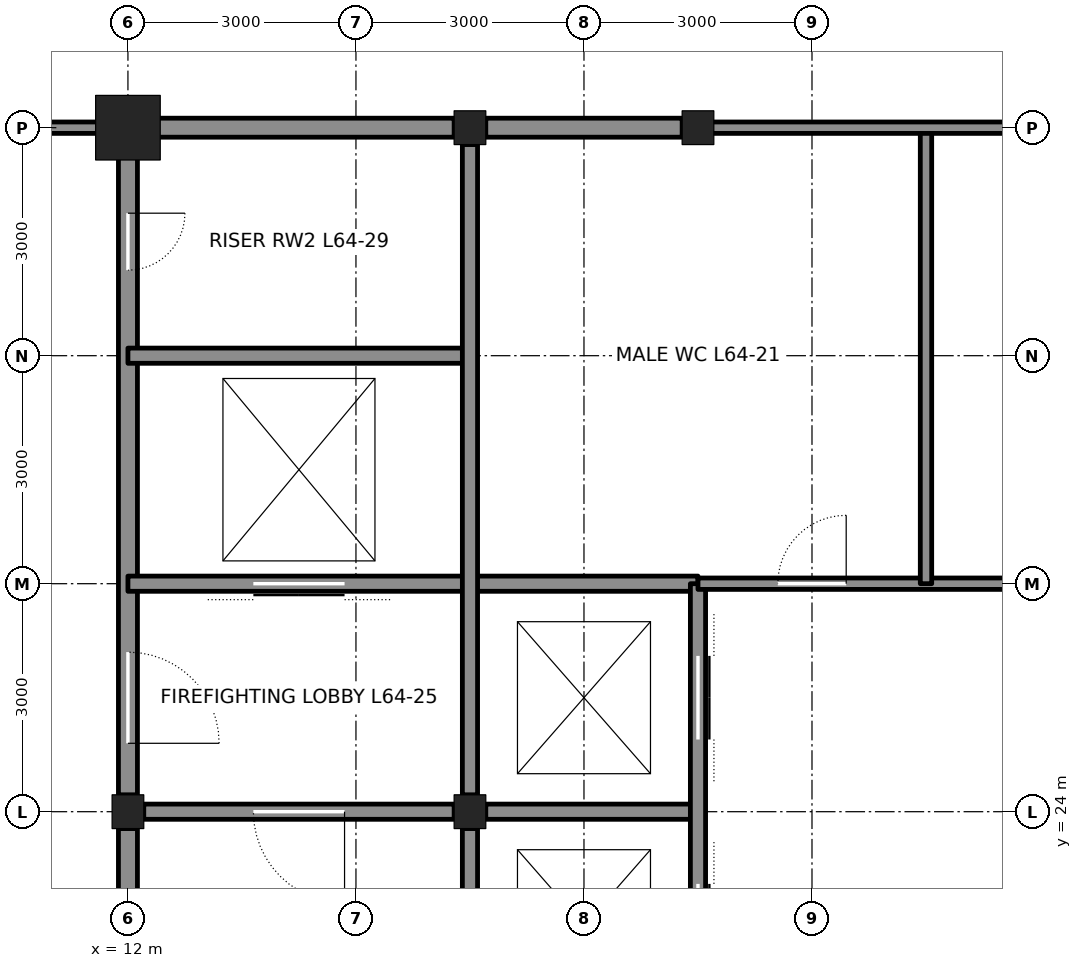
"""IFC4 building model, lengths in metres.
Left out: names, types, materials, properties, quantities, classifications, styles, units other than length and angle.
Written with IfcOpenShell. Run it as: python <this file> out.ifc"""

import sys

from ifc_helpers import new_model, si_unit, direction, frame, frame_2d, origin, origin_2d, place, context, subcontext, project, spatial, rectangle, hollow_rectangle, i_section, extrude, element, fill, save


model = new_model("IFC4")
c1 = context("Model", 3, precision=1e-05, world=origin(), true_north=direction((0.0, 1.0)))
c2 = subcontext(c1, "Body", "Model", "MODEL_VIEW")
j1 = project(units=[si_unit("LENGTHUNIT", "METRE"), si_unit("PLANEANGLEUNIT", "RADIAN")], contexts=[c1])
p1 = place(None, origin())
s1 = spatial("IfcSite", under=j1, at=p1, CompositionType="ELEMENT")
p2 = place(p1, origin())
s2 = spatial("IfcBuilding", under=s1, at=p2, CompositionType="ELEMENT")
p3 = place(p2, frame((0.0, 0.0, 287.4)))
s3 = spatial("IfcBuildingStorey", under=s2, at=p3, CompositionType="ELEMENT", Elevation=287.4)
p4 = place(p3, frame((12.0, 33.0, 0.0), z_axis=(0.0, 0.0, 1.0), x_axis=(1.0, 0.0, 0.0)))
e1 = element("IfcColumn", 1, at=p4, inside=s3, PredefinedType="COLUMN", context=c2, shape_type="SweptSolid", body=[
    extrude(hollow_rectangle(XDim=0.85, YDim=0.85, WallThickness=0.085, at=origin_2d()), origin(), (0.0, 0.0, 1.0), 4.2),
])
for number, where, z_axis, x_axis in (
    (2, (16.5, 33.0, 0.0), (0.0, 0.0, 1.0), (1.0, 0.0, 0.0)),
    (3, (19.5, 33.0, 0.0), (0.0, 0.0, 1.0), (1.0, 0.0, 0.0)),
    (4, (12.0, 24.0, 0.0), (0.0, 0.0, 1.0), (1.0, 0.0, 0.0)),
    (5, (16.5, 24.0, 0.0), (0.0, 0.0, 1.0), (1.0, 0.0, 0.0)),
):
    element("IfcColumn", number, at=place(p3, frame(where, z_axis=z_axis, x_axis=x_axis)), inside=s3, PredefinedType="COLUMN", context=c2, shape_type="SweptSolid", body=[
        extrude(i_section(OverallWidth=0.417, OverallDepth=0.445, WebThickness=0.039, FlangeThickness=0.063, at=origin_2d()), origin(), (0.0, 0.0, 1.0), 4.2),
    ])
p5 = place(p3, frame((12.0, 21.222, 0.0), z_axis=(0.0, 0.0, 1.0), x_axis=(0.0, 1.0, 0.0)))
e6 = element("IfcWall", 6, at=p5, inside=s3, PredefinedType="SOLIDWALL", context=c2, shape_type="SweptSolid", body=[
    extrude(rectangle(XDim=2.555, YDim=0.25, at=frame_2d((1.278, 0.0))), origin(), (0.0, 0.0, 1.0), 3.113),
])
p6 = place(p3, frame((12.0, 24.222, 0.0), z_axis=(0.0, 0.0, 1.0), x_axis=(0.0, 1.0, 0.0)))
e7 = element("IfcWall", 7, at=p6, inside=s3, PredefinedType="SOLIDWALL", context=c2, shape_type="SweptSolid", body=[
    extrude(rectangle(XDim=8.528, YDim=0.25, at=frame_2d((4.264, 0.0))), origin(), (0.0, 0.0, 1.0), 3.113),
])
p7 = place(p6, frame((0.678, 0.0, 0.0)))
e8 = element("IfcOpeningElement", 8, at=p7, cuts=e7, PredefinedType="OPENING", context=c2, shape_type="SweptSolid", body=[
    extrude(rectangle(XDim=1.2, YDim=2.1, at=frame_2d((0.6, 1.05))), frame((0.0, 0.135, 0.0), z_axis=(0.0, -1.0, 0.0), x_axis=(1.0, 0.0, 0.0)), (0.0, 0.0, 1.0), 0.27),
])
p8 = place(p6, frame((6.903, 0.0, 0.0)))
e9 = element("IfcOpeningElement", 9, at=p8, cuts=e7, PredefinedType="OPENING", context=c2, shape_type="SweptSolid", body=[
    extrude(rectangle(XDim=0.75, YDim=2.1, at=frame_2d((0.375, 1.05))), frame((0.0, 0.135, 0.0), z_axis=(0.0, -1.0, 0.0), x_axis=(1.0, 0.0, 0.0)), (0.0, 0.0, 1.0), 0.27),
])
p9 = place(p3, frame((12.208, 24.0, 0.0), z_axis=(0.0, 0.0, 1.0), x_axis=(1.0, 0.0, 0.0)))
e10 = element("IfcWall", 10, at=p9, inside=s3, PredefinedType="SOLIDWALL", context=c2, shape_type="SweptSolid", body=[
    extrude(rectangle(XDim=4.083, YDim=0.2, at=frame_2d((2.042, 0.0))), origin(), (0.0, 0.0, 1.0), 3.09),
])
p10 = place(p9, frame((1.442, 0.0, 0.0)))
e11 = element("IfcOpeningElement", 11, at=p10, cuts=e10, PredefinedType="OPENING", context=c2, shape_type="SweptSolid", body=[
    extrude(rectangle(XDim=1.2, YDim=2.1, at=frame_2d((0.6, 1.05))), frame((0.0, 0.11, 0.0), z_axis=(0.0, -1.0, 0.0), x_axis=(1.0, 0.0, 0.0)), (0.0, 0.0, 1.0), 0.22),
])
p11 = place(p3, frame((16.708, 24.0, 0.0), z_axis=(0.0, 0.0, 1.0), x_axis=(1.0, 0.0, 0.0)))
e12 = element("IfcWall", 12, at=p11, inside=s3, PredefinedType="SOLIDWALL", context=c2, shape_type="SweptSolid", body=[
    extrude(rectangle(XDim=2.792, YDim=0.2, at=frame_2d((1.396, 0.0))), origin(), (0.0, 0.0, 1.0), 3.09),
])
p12 = place(p3, frame((12.0, 27.0, 0.0), z_axis=(0.0, 0.0, 1.0), x_axis=(1.0, 0.0, 0.0)))
e13 = element("IfcWall", 13, at=p12, inside=s3, PredefinedType="SOLIDWALL", context=c2, shape_type="SweptSolid", body=[
    extrude(rectangle(XDim=7.5, YDim=0.2, at=frame_2d((3.75, 0.0))), origin(), (0.0, 0.0, 1.0), 4.04),
])
p13 = place(p12, frame((1.65, 0.0, 0.0)))
e14 = element("IfcOpeningElement", 14, at=p13, cuts=e13, PredefinedType="OPENING", context=c2, shape_type="SweptSolid", body=[
    extrude(rectangle(XDim=1.2, YDim=2.1, at=frame_2d((0.6, 1.05))), frame((0.0, 0.11, 0.0), z_axis=(0.0, -1.0, 0.0), x_axis=(1.0, 0.0, 0.0)), (0.0, 0.0, 1.0), 0.22),
])
p14 = place(p3, frame((12.0, 30.0, 0.0), z_axis=(0.0, 0.0, 1.0), x_axis=(1.0, 0.0, 0.0)))
e15 = element("IfcWall", 15, at=p14, inside=s3, PredefinedType="SOLIDWALL", context=c2, shape_type="SweptSolid", body=[
    extrude(rectangle(XDim=4.5, YDim=0.2, at=frame_2d((2.25, 0.0))), origin(), (0.0, 0.0, 1.0), 4.04),
])
p15 = place(p3, frame((12.25, 33.0, 0.0), z_axis=(0.0, 0.0, 1.0), x_axis=(1.0, 0.0, 0.0)))
e16 = element("IfcWall", 16, at=p15, inside=s3, PredefinedType="SOLIDWALL", context=c2, shape_type="SweptSolid", body=[
    extrude(rectangle(XDim=4.042, YDim=0.25, at=frame_2d((2.021, 0.0))), origin(), (0.0, 0.0, 1.0), 3.182),
])
p16 = place(p3, frame((16.708, 33.0, 0.0), z_axis=(0.0, 0.0, 1.0), x_axis=(1.0, 0.0, 0.0)))
e17 = element("IfcWall", 17, at=p16, inside=s3, PredefinedType="SOLIDWALL", context=c2, shape_type="SweptSolid", body=[
    extrude(rectangle(XDim=2.583, YDim=0.25, at=frame_2d((1.292, 0.0))), origin(), (0.0, 0.0, 1.0), 3.182),
])
p17 = place(p3, frame((16.5, 21.222, 0.0), z_axis=(0.0, 0.0, 1.0), x_axis=(0.0, 1.0, 0.0)))
e18 = element("IfcWall", 18, at=p17, inside=s3, PredefinedType="SOLIDWALL", context=c2, shape_type="SweptSolid", body=[
    extrude(rectangle(XDim=2.555, YDim=0.2, at=frame_2d((1.278, 0.0))), origin(), (0.0, 0.0, 1.0), 3.113),
])
p18 = place(p3, frame((16.5, 24.222, 0.0), z_axis=(0.0, 0.0, 1.0), x_axis=(0.0, 1.0, 0.0)))
e19 = element("IfcWall", 19, at=p18, inside=s3, PredefinedType="SOLIDWALL", context=c2, shape_type="SweptSolid", body=[
    extrude(rectangle(XDim=8.555, YDim=0.2, at=frame_2d((4.278, 0.0))), origin(), (0.0, 0.0, 1.0), 3.113),
])
p19 = place(p3, frame((19.5, 15.0, 0.0), z_axis=(0.0, 0.0, 1.0), x_axis=(0.0, 1.0, 0.0)))
e20 = element("IfcWall", 20, at=p19, inside=s3, PredefinedType="SOLIDWALL", context=c2, shape_type="SweptSolid", body=[
    extrude(rectangle(XDim=12.0, YDim=0.2, at=frame_2d((6.0, 0.0))), origin(), (0.0, 0.0, 1.0), 3.065),
])
p20 = place(p19, frame((0.95, 0.0, 0.0)))
e21 = element("IfcOpeningElement", 21, at=p20, cuts=e20, PredefinedType="OPENING", context=c2, shape_type="SweptSolid", body=[
    extrude(rectangle(XDim=1.1, YDim=2.1, at=frame_2d((0.55, 1.05))), frame((0.0, 0.11, 0.0), z_axis=(0.0, -1.0, 0.0), x_axis=(1.0, 0.0, 0.0)), (0.0, 0.0, 1.0), 0.22),
])
p21 = place(p19, frame((3.95, 0.0, 0.0)))
e22 = element("IfcOpeningElement", 22, at=p21, cuts=e20, PredefinedType="OPENING", context=c2, shape_type="SweptSolid", body=[
    extrude(rectangle(XDim=1.1, YDim=2.1, at=frame_2d((0.55, 1.05))), frame((0.0, 0.11, 0.0), z_axis=(0.0, -1.0, 0.0), x_axis=(1.0, 0.0, 0.0)), (0.0, 0.0, 1.0), 0.22),
])
p22 = place(p19, frame((6.95, 0.0, 0.0)))
e23 = element("IfcOpeningElement", 23, at=p22, cuts=e20, PredefinedType="OPENING", context=c2, shape_type="SweptSolid", body=[
    extrude(rectangle(XDim=1.1, YDim=2.1, at=frame_2d((0.55, 1.05))), frame((0.0, 0.11, 0.0), z_axis=(0.0, -1.0, 0.0), x_axis=(1.0, 0.0, 0.0)), (0.0, 0.0, 1.0), 0.22),
])
p23 = place(p19, frame((9.95, 0.0, 0.0)))
e24 = element("IfcOpeningElement", 24, at=p23, cuts=e20, PredefinedType="OPENING", context=c2, shape_type="SweptSolid", body=[
    extrude(rectangle(XDim=1.1, YDim=2.1, at=frame_2d((0.55, 1.05))), frame((0.0, 0.11, 0.0), z_axis=(0.0, -1.0, 0.0), x_axis=(1.0, 0.0, 0.0)), (0.0, 0.0, 1.0), 0.22),
])
p24 = place(p3, frame((19.5, 27.0, 0.0), z_axis=(0.0, 0.0, 1.0), x_axis=(1.0, 0.0, 0.0)))
e25 = element("IfcWall", 25, at=p24, inside=s3, PredefinedType="PARTITIONING", context=c2, shape_type="SweptSolid", body=[
    extrude(rectangle(XDim=6.0, YDim=0.15, at=frame_2d((3.0, 0.0))), origin(), (0.0, 0.0, 1.0), 4.04),
])
p25 = place(p24, frame((1.05, 0.0, 0.0)))
e26 = element("IfcOpeningElement", 26, at=p25, cuts=e25, PredefinedType="OPENING", context=c2, shape_type="SweptSolid", body=[
    extrude(rectangle(XDim=0.9, YDim=2.1, at=frame_2d((0.45, 1.05))), frame((0.0, 0.085, 0.0), z_axis=(0.0, -1.0, 0.0), x_axis=(1.0, 0.0, 0.0)), (0.0, 0.0, 1.0), 0.17),
])
p26 = place(p24, frame((4.05, 0.0, 0.0)))
e27 = element("IfcOpeningElement", 27, at=p26, cuts=e25, PredefinedType="OPENING", context=c2, shape_type="SweptSolid", body=[
    extrude(rectangle(XDim=0.9, YDim=2.1, at=frame_2d((0.45, 1.05))), frame((0.0, 0.085, 0.0), z_axis=(0.0, -1.0, 0.0), x_axis=(1.0, 0.0, 0.0)), (0.0, 0.0, 1.0), 0.17),
])
p27 = place(p3, frame((22.5, 27.0, 0.0), z_axis=(0.0, 0.0, 1.0), x_axis=(0.0, 1.0, 0.0)))
e28 = element("IfcWall", 28, at=p27, inside=s3, PredefinedType="PARTITIONING", context=c2, shape_type="SweptSolid", body=[
    extrude(rectangle(XDim=6.0, YDim=0.15, at=frame_2d((3.0, 0.0))), origin(), (0.0, 0.0, 1.0), 4.04),
])
p28 = place(p3, frame((19.5, 33.0, 0.0), z_axis=(0.0, 0.0, 1.0), x_axis=(1.0, 0.0, 0.0)))
e29 = element("IfcWall", 29, at=p28, inside=s3, PredefinedType="PARTITIONING", context=c2, shape_type="SweptSolid", body=[
    extrude(rectangle(XDim=6.0, YDim=0.15, at=frame_2d((3.0, 0.0))), origin(), (0.0, 0.0, 1.0), 3.182),
])
p29 = place(p3, frame((10.2, 33.0, 0.0), z_axis=(0.0, 0.0, 1.0), x_axis=(1.0, 0.0, 0.0)))
e30 = element("IfcWall", 30, at=p29, inside=s3, PredefinedType="PARTITIONING", context=c2, shape_type="SweptSolid", body=[
    extrude(rectangle(XDim=1.8, YDim=0.15, at=frame_2d((0.9, 0.0))), origin(), (0.0, 0.0, 1.0), 3.271),
])
p30 = place(p10, frame((1.2, 0.0, 0.0), z_axis=(0.0, 0.0, 1.0), x_axis=(-1.0, 0.0, 0.0)))
e31 = element("IfcDoor", 31, at=p30, inside=s3, OperationType="SINGLE_SWING_LEFT", PredefinedType="DOOR", context=c2, shape_type="SweptSolid", body=[
    extrude(rectangle(XDim=1.2, YDim=2.1, at=frame_2d((0.6, 1.05))), frame((0.0, 0.025, 0.0), z_axis=(0.0, -1.0, 0.0), x_axis=(1.0, 0.0, 0.0)), (0.0, 0.0, 1.0), 0.05),
])
fill(e11, e31)
p31 = place(p7, frame((1.2, 0.0, 0.0), z_axis=(0.0, 0.0, 1.0), x_axis=(-1.0, 0.0, 0.0)))
e32 = element("IfcDoor", 32, at=p31, inside=s3, OperationType="SINGLE_SWING_RIGHT", PredefinedType="DOOR", context=c2, shape_type="SweptSolid", body=[
    extrude(rectangle(XDim=1.2, YDim=2.1, at=frame_2d((0.6, 1.05))), frame((0.0, 0.025, 0.0), z_axis=(0.0, -1.0, 0.0), x_axis=(1.0, 0.0, 0.0)), (0.0, 0.0, 1.0), 0.05),
])
fill(e8, e32)
p32 = place(p13, origin())
e33 = element("IfcDoor", 33, at=p32, inside=s3, OperationType="DOUBLE_DOOR_SLIDING", PredefinedType="DOOR", context=c2, shape_type="SweptSolid", body=[
    extrude(rectangle(XDim=1.2, YDim=2.1, at=frame_2d((0.6, 1.05))), frame((0.0, 0.025, 0.0), z_axis=(0.0, -1.0, 0.0), x_axis=(1.0, 0.0, 0.0)), (0.0, 0.0, 1.0), 0.05),
])
fill(e14, e33)
p33 = place(p8, frame((0.75, 0.0, 0.0), z_axis=(0.0, 0.0, 1.0), x_axis=(-1.0, 0.0, 0.0)))
e34 = element("IfcDoor", 34, at=p33, inside=s3, OperationType="SINGLE_SWING_LEFT", PredefinedType="DOOR", context=c2, shape_type="SweptSolid", body=[
    extrude(rectangle(XDim=0.75, YDim=2.1, at=frame_2d((0.375, 1.05))), frame((0.0, 0.025, 0.0), z_axis=(0.0, -1.0, 0.0), x_axis=(1.0, 0.0, 0.0)), (0.0, 0.0, 1.0), 0.05),
])
fill(e9, e34)
p34 = place(p25, origin())
e35 = element("IfcDoor", 35, at=p34, inside=s3, OperationType="SINGLE_SWING_RIGHT", PredefinedType="DOOR", context=c2, shape_type="SweptSolid", body=[
    extrude(rectangle(XDim=0.9, YDim=2.1, at=frame_2d((0.45, 1.05))), frame((0.0, 0.025, 0.0), z_axis=(0.0, -1.0, 0.0), x_axis=(1.0, 0.0, 0.0)), (0.0, 0.0, 1.0), 0.05),
])
fill(e26, e35)
p35 = place(p22, origin())
e36 = element("IfcDoor", 36, at=p35, inside=s3, OperationType="DOUBLE_DOOR_SLIDING", PredefinedType="DOOR", context=c2, shape_type="SweptSolid", body=[
    extrude(rectangle(XDim=1.1, YDim=2.1, at=frame_2d((0.55, 1.05))), frame((0.0, 0.025, 0.0), z_axis=(0.0, -1.0, 0.0), x_axis=(1.0, 0.0, 0.0)), (0.0, 0.0, 1.0), 0.05),
])
fill(e23, e36)
p36 = place(p23, origin())
e37 = element("IfcDoor", 37, at=p36, inside=s3, OperationType="DOUBLE_DOOR_SLIDING", PredefinedType="DOOR", context=c2, shape_type="SweptSolid", body=[
    extrude(rectangle(XDim=1.1, YDim=2.1, at=frame_2d((0.55, 1.05))), frame((0.0, 0.025, 0.0), z_axis=(0.0, -1.0, 0.0), x_axis=(1.0, 0.0, 0.0)), (0.0, 0.0, 1.0), 0.05),
])
fill(e24, e37)
save(model, sys.argv[1])
